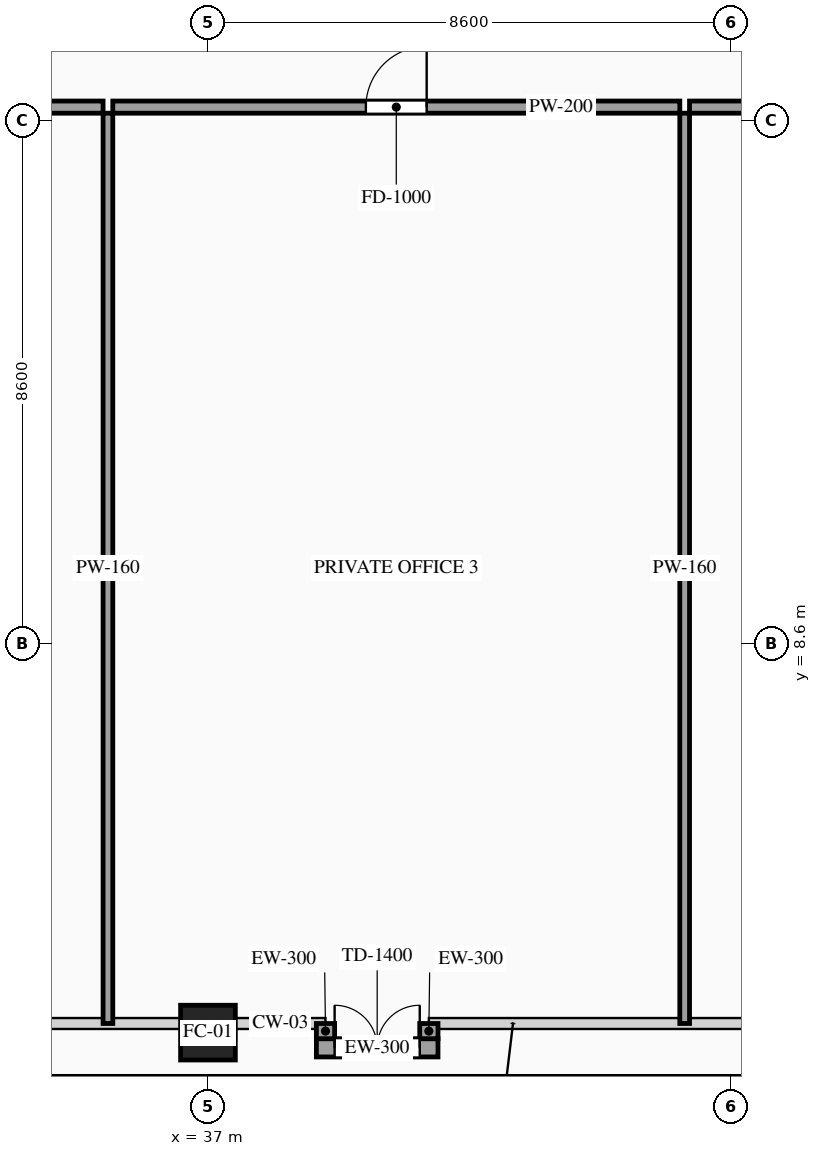
"""IFC4 building model, lengths in metres.
Left out: names, types, materials, properties, quantities, classifications, styles, units other than length and angle.
Written with IfcOpenShell. Run it as: python <this file> out.ifc"""

import sys

from ifc_helpers import new_model, si_unit, direction, frame, frame_2d, origin, origin_2d, place, context, subcontext, project, spatial, rectangle, hollow_rectangle, extrude, source, transform, mapped, element, fill, save


model = new_model("IFC4")
c1 = context("Model", 3, precision=1e-05, world=origin(), true_north=direction((0.0, 1.0)))
c2 = subcontext(c1, "Body", "Model", "MODEL_VIEW")
j1 = project(units=[si_unit("LENGTHUNIT", "METRE"), si_unit("PLANEANGLEUNIT", "RADIAN")], contexts=[c1])
p1 = place(None, origin())
s1 = spatial("IfcSite", under=j1, at=p1, CompositionType="ELEMENT")
p2 = place(p1, origin())
s2 = spatial("IfcBuilding", under=s1, at=p2, CompositionType="ELEMENT")
p3 = place(p2, frame((0.0, 0.0, 145.2)))
s3 = spatial("IfcBuildingStorey", under=s2, at=p3, CompositionType="ELEMENT", Elevation=145.2)
m1 = source(origin(), c2, "Body", "SweptSolid", [
    extrude(hollow_rectangle(XDim=0.9, YDim=0.9, WallThickness=0.042, at=origin_2d()), origin(), (0.0, 0.0, 1.0), 3.6),
])
p4 = place(p3, frame((37.0, 2.2, 0.0), z_axis=(0.0, 0.0, 1.0), x_axis=(1.0, 0.0, 0.0)))
e1 = element("IfcColumn", 1, at=p4, inside=s3, PredefinedType="COLUMN", context=c2, shape_type="MappedRepresentation", body=[
    mapped(m1, transform((0.0, 0.0, 0.0), scale=1.0)),
])
p5 = place(p3, frame((38.783, 1.95, 0.0), z_axis=(0.0, 0.0, 1.0), x_axis=(1.0, 0.0, 0.0)))
e2 = element("IfcWall", 2, at=p5, inside=s3, PredefinedType="SOLIDWALL", context=c2, shape_type="SweptSolid", body=[
    extrude(rectangle(XDim=2.0, YDim=0.3, at=frame_2d((1.0, 0.0))), origin(), (0.0, 0.0, 1.0), 3.38),
])
p6 = place(p5, frame((0.3, 0.0, 0.0)))
e3 = element("IfcOpeningElement", 3, at=p6, cuts=e2, PredefinedType="OPENING", context=c2, shape_type="SweptSolid", body=[
    extrude(rectangle(XDim=1.4, YDim=2.3, at=frame_2d((0.7, 1.15))), frame((0.0, 0.165, 0.0), z_axis=(0.0, -1.0, 0.0), x_axis=(1.0, 0.0, 0.0)), (0.0, 0.0, 1.0), 0.33),
])
m2 = source(origin(), c2, "Body", "SweptSolid", [
    extrude(rectangle(XDim=0.25, YDim=0.3, at=frame_2d((0.125, 0.0))), origin(), (0.0, 0.0, 1.0), 3.38),
])
for number, where, z_axis, x_axis in (
    (4, (38.933, 2.35, 0.0), (0.0, 0.0, 1.0), (0.0, -1.0, 0.0)),
    (5, (40.633, 2.1, 0.0), (0.0, 0.0, 1.0), (0.0, 1.0, 0.0)),
):
    element("IfcWall", number, at=place(p3, frame(where, z_axis=z_axis, x_axis=x_axis)), inside=s3, PredefinedType="SOLIDWALL", context=c2, shape_type="MappedRepresentation", body=[
        mapped(m2, transform((0.0, 0.0, 0.0), scale=1.0)),
    ])
p7 = place(p3, frame((31.214, 17.42, 0.0), z_axis=(0.0, 0.0, 1.0), x_axis=(1.0, 0.0, 0.0)))
e6 = element("IfcWall", 6, at=p7, inside=s3, PredefinedType="PARTITIONING", context=c2, shape_type="SweptSolid", body=[
    extrude(rectangle(XDim=4.061, YDim=0.2, at=frame_2d((2.03, 0.0))), origin(), (0.0, 0.0, 1.0), 3.38),
])
p8 = place(p7, frame((1.531, 0.0, 0.0)))
e7 = element("IfcOpeningElement", 7, at=p8, cuts=e6, PredefinedType="OPENING", context=c2, shape_type="SweptSolid", body=[
    extrude(rectangle(XDim=1.0, YDim=2.2, at=frame_2d((0.5, 1.1))), frame((0.0, 0.115, 0.0), z_axis=(0.0, -1.0, 0.0), x_axis=(1.0, 0.0, 0.0)), (0.0, 0.0, 1.0), 0.23),
])
m3 = source(origin(), c2, "Body", "SweptSolid", [
    extrude(rectangle(XDim=14.97, YDim=0.16, at=frame_2d((7.485, 0.0))), origin(), (0.0, 0.0, 1.0), 3.38),
])
p9 = place(p3, frame((35.355, 2.35, 0.0), z_axis=(0.0, 0.0, 1.0), x_axis=(0.0, 1.0, 0.0)))
e8 = element("IfcWall", 8, at=p9, inside=s3, PredefinedType="PARTITIONING", context=c2, shape_type="MappedRepresentation", body=[
    mapped(m3, transform((0.0, 0.0, 0.0), scale=1.0)),
])
p10 = place(p3, frame((35.435, 17.42, 0.0), z_axis=(0.0, 0.0, 1.0), x_axis=(1.0, 0.0, 0.0)))
e9 = element("IfcWall", 9, at=p10, inside=s3, PredefinedType="PARTITIONING", context=c2, shape_type="SweptSolid", body=[
    extrude(rectangle(XDim=9.325, YDim=0.2, at=frame_2d((4.663, 0.0))), origin(), (0.0, 0.0, 1.0), 3.38),
])
p11 = place(p10, frame((4.162, 0.0, 0.0)))
e10 = element("IfcOpeningElement", 10, at=p11, cuts=e9, PredefinedType="OPENING", context=c2, shape_type="SweptSolid", body=[
    extrude(rectangle(XDim=1.0, YDim=2.2, at=frame_2d((0.5, 1.1))), frame((0.0, 0.115, 0.0), z_axis=(0.0, -1.0, 0.0), x_axis=(1.0, 0.0, 0.0)), (0.0, 0.0, 1.0), 0.23),
])
p12 = place(p3, frame((44.84, 2.35, 0.0), z_axis=(0.0, 0.0, 1.0), x_axis=(0.0, 1.0, 0.0)))
e11 = element("IfcWall", 11, at=p12, inside=s3, PredefinedType="PARTITIONING", context=c2, shape_type="MappedRepresentation", body=[
    mapped(m3, transform((0.0, 0.0, 0.0), scale=1.0)),
])
p13 = place(p3, frame((44.92, 17.42, 0.0), z_axis=(0.0, 0.0, 1.0), x_axis=(1.0, 0.0, 0.0)))
e12 = element("IfcWall", 12, at=p13, inside=s3, PredefinedType="PARTITIONING", context=c2, shape_type="SweptSolid", body=[
    extrude(rectangle(XDim=4.062, YDim=0.2, at=frame_2d((2.031, 0.0))), origin(), (0.0, 0.0, 1.0), 3.38),
])
p14 = place(p13, frame((1.531, 0.0, 0.0)))
e13 = element("IfcOpeningElement", 13, at=p14, cuts=e12, PredefinedType="OPENING", context=c2, shape_type="SweptSolid", body=[
    extrude(rectangle(XDim=1.0, YDim=2.2, at=frame_2d((0.5, 1.1))), frame((0.0, 0.115, 0.0), z_axis=(0.0, -1.0, 0.0), x_axis=(1.0, 0.0, 0.0)), (0.0, 0.0, 1.0), 0.23),
])
m4 = source(origin(), c2, "Body", "SweptSolid", [
    extrude(rectangle(XDim=1.4, YDim=2.3, at=frame_2d((0.7, 1.15))), frame((0.0, 0.025, 0.0), z_axis=(0.0, -1.0, 0.0), x_axis=(1.0, 0.0, 0.0)), (0.0, 0.0, 1.0), 0.05),
])
p15 = place(p6, origin())
e14 = element("IfcDoor", 14, at=p15, inside=s3, OperationType="DOUBLE_DOOR_SINGLE_SWING", PredefinedType="DOOR", context=c2, shape_type="MappedRepresentation", body=[
    mapped(m4, transform((0.0, 0.0, 0.0), scale=1.0)),
])
fill(e3, e14)
m5 = source(origin(), c2, "Body", "SweptSolid", [
    extrude(rectangle(XDim=1.0, YDim=2.2, at=frame_2d((0.5, 1.1))), frame((0.0, 0.025, 0.0), z_axis=(0.0, -1.0, 0.0), x_axis=(1.0, 0.0, 0.0)), (0.0, 0.0, 1.0), 0.05),
])
p16 = place(p11, origin())
e15 = element("IfcDoor", 15, at=p16, inside=s3, OperationType="SINGLE_SWING_RIGHT", PredefinedType="DOOR", context=c2, shape_type="MappedRepresentation", body=[
    mapped(m5, transform((0.0, 0.0, 0.0), scale=1.0)),
])
fill(e10, e15)
save(model, sys.argv[1])
